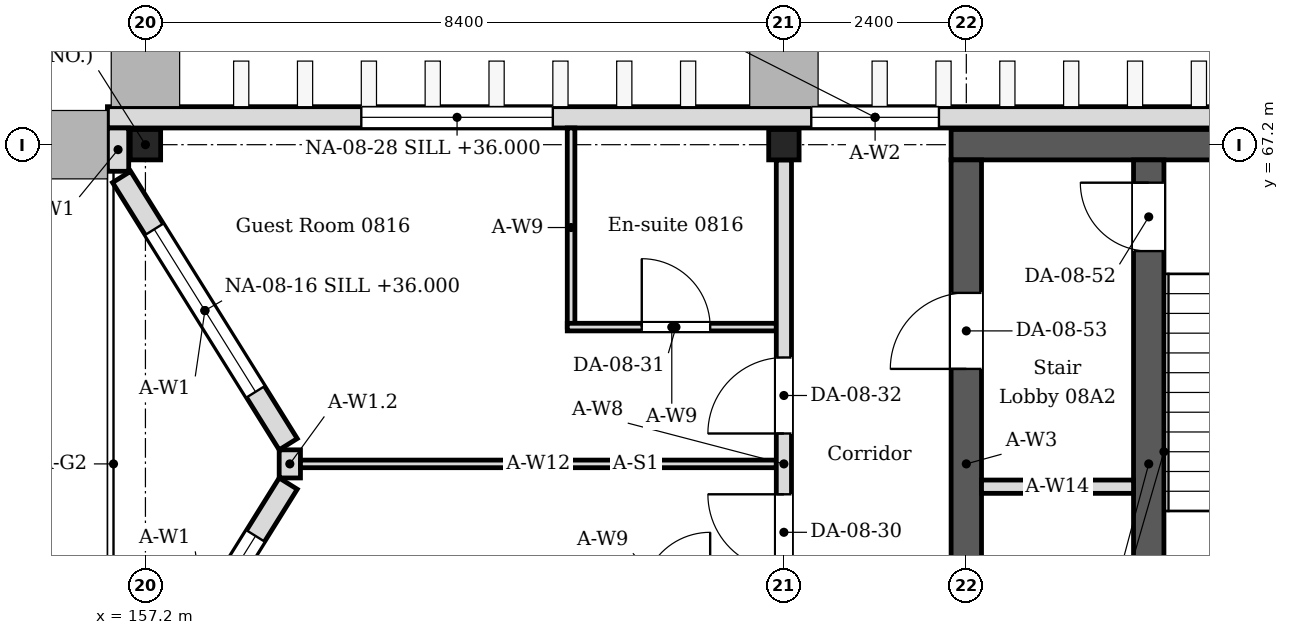
"""IFC4 building model, lengths in metres.
Left out: names, types, materials, properties, quantities, classifications, styles, units other than length and angle.
Written with IfcOpenShell. Run it as: python <this file> out.ifc"""

import sys

from ifc_helpers import new_model, si_unit, direction, frame, frame_2d, origin, origin_2d, place, context, subcontext, project, spatial, rectangle, i_section, extrude, element, fill, save


model = new_model("IFC4")
c1 = context("Model", 3, precision=1e-05, world=origin(), true_north=direction((0.0, 1.0)))
c2 = subcontext(c1, "Body", "Model", "MODEL_VIEW")
j1 = project(units=[si_unit("LENGTHUNIT", "METRE"), si_unit("PLANEANGLEUNIT", "RADIAN")], contexts=[c1])
p1 = place(None, origin())
s1 = spatial("IfcSite", under=j1, at=p1, CompositionType="ELEMENT")
p2 = place(p1, origin())
s2 = spatial("IfcBuilding", under=s1, at=p2, CompositionType="ELEMENT")
p3 = place(p2, frame((0.0, 0.0, 35.4)))
s3 = spatial("IfcBuildingStorey", under=s2, at=p3, CompositionType="ELEMENT", Elevation=35.4)
for number, where, z_axis, x_axis in (
    (1, (157.2, 67.2, 0.0), (0.0, 0.0, 1.0), (1.0, 0.0, 0.0)),
    (2, (165.6, 67.2, 0.0), (0.0, 0.0, 1.0), (1.0, 0.0, 0.0)),
):
    element("IfcColumn", number, at=place(p3, frame(where, z_axis=z_axis, x_axis=x_axis)), inside=s3, PredefinedType="COLUMN", context=c2, shape_type="SweptSolid", body=[
        extrude(i_section(OverallWidth=0.4, OverallDepth=0.4, WebThickness=0.013, FlangeThickness=0.021, FilletRadius=0.022, at=origin_2d()), origin(), (0.0, 0.0, 1.0), 4.2),
    ])
p4 = place(p3, frame((167.8, 67.2, 0.0), z_axis=(0.0, 0.0, 1.0), x_axis=(1.0, 0.0, 0.0)))
e3 = element("IfcWall", 3, at=p4, inside=s3, PredefinedType="SOLIDWALL", context=c2, shape_type="SweptSolid", body=[
    extrude(rectangle(XDim=8.8, YDim=0.4, at=frame_2d((4.4, 0.0))), origin(), (0.0, 0.0, 1.0), 4.05),
])
p5 = place(p3, frame((168.0, 59.0, 0.0), z_axis=(0.0, 0.0, 1.0), x_axis=(0.0, 1.0, 0.0)))
e4 = element("IfcWall", 4, at=p5, inside=s3, PredefinedType="SOLIDWALL", context=c2, shape_type="SweptSolid", body=[
    extrude(rectangle(XDim=8.0, YDim=0.4, at=frame_2d((4.0, 0.0))), origin(), (0.0, 0.0, 1.0), 4.05),
])
p6 = place(p5, frame((5.25, 0.0, 0.0)))
e5 = element("IfcOpeningElement", 5, at=p6, cuts=e4, PredefinedType="OPENING", context=c2, shape_type="SweptSolid", body=[
    extrude(rectangle(XDim=1.0, YDim=2.1, at=frame_2d((0.5, 1.05))), frame((0.0, 0.21, 0.0), z_axis=(0.0, -1.0, 0.0), x_axis=(1.0, 0.0, 0.0)), (0.0, 0.0, 1.0), 0.42),
])
p7 = place(p5, frame((1.275, 0.0, 0.0)))
e6 = element("IfcOpeningElement", 6, at=p7, cuts=e4, PredefinedType="OPENING", context=c2, shape_type="SweptSolid", body=[
    extrude(rectangle(XDim=1.05, YDim=2.1, at=frame_2d((0.525, 1.05))), frame((0.0, 0.21, 0.0), z_axis=(0.0, -1.0, 0.0), x_axis=(1.0, 0.0, 0.0)), (0.0, 0.0, 1.0), 0.42),
])
p8 = place(p3, frame((156.886, 59.224, 0.0), z_axis=(0.0, 0.0, 1.0), x_axis=(0.529018946142, 0.848610013271, 0.0)))
e7 = element("IfcWall", 7, at=p8, inside=s3, PredefinedType="SOLIDWALL", context=c2, shape_type="SweptSolid", body=[
    extrude(rectangle(XDim=4.144, YDim=0.28, at=frame_2d((2.072, 0.0))), origin(), (0.0, 0.0, 1.0), 4.05),
])
p9 = place(p8, frame((0.812, 0.0, 0.6)))
e8 = element("IfcOpeningElement", 8, at=p9, cuts=e7, PredefinedType="OPENING", context=c2, shape_type="SweptSolid", body=[
    extrude(rectangle(XDim=2.52, YDim=2.4, at=frame_2d((1.26, 1.2))), frame((0.0, 0.15, 0.0), z_axis=(0.0, -1.0, 0.0), x_axis=(1.0, 0.0, 0.0)), (0.0, 0.0, 1.0), 0.3),
])
p10 = place(p3, frame((159.079, 63.259, 0.0), z_axis=(0.0, 0.0, 1.0), x_axis=(-0.529018946142, 0.848610013271, 0.0)))
e9 = element("IfcWall", 9, at=p10, inside=s3, PredefinedType="SOLIDWALL", context=c2, shape_type="SweptSolid", body=[
    extrude(rectangle(XDim=4.144, YDim=0.28, at=frame_2d((2.072, 0.0))), origin(), (0.0, 0.0, 1.0), 4.05),
])
p11 = place(p10, frame((0.812, 0.0, 0.6)))
e10 = element("IfcOpeningElement", 10, at=p11, cuts=e9, PredefinedType="OPENING", context=c2, shape_type="SweptSolid", body=[
    extrude(rectangle(XDim=2.52, YDim=2.4, at=frame_2d((1.26, 1.2))), frame((0.0, 0.15, 0.0), z_axis=(0.0, -1.0, 0.0), x_axis=(1.0, 0.0, 0.0)), (0.0, 0.0, 1.0), 0.3),
])
p12 = place(p3, frame((159.1, 62.815, 0.0), z_axis=(0.0, 0.0, 1.0), x_axis=(0.0, 1.0, 0.0)))
e11 = element("IfcWall", 11, at=p12, inside=s3, PredefinedType="SOLIDWALL", context=c2, shape_type="SweptSolid", body=[
    extrude(rectangle(XDim=0.37, YDim=0.28, at=frame_2d((0.185, 0.0))), origin(), (0.0, 0.0, 1.0), 3.604),
])
p13 = place(p3, frame((156.84, 66.85, 0.0), z_axis=(0.0, 0.0, 1.0), x_axis=(0.0, 1.0, 0.0)))
e12 = element("IfcWall", 12, at=p13, inside=s3, PredefinedType="SOLIDWALL", context=c2, shape_type="SweptSolid", body=[
    extrude(rectangle(XDim=0.57, YDim=0.28, at=frame_2d((0.285, 0.0))), origin(), (0.0, 0.0, 1.0), 4.05),
])
p14 = place(p3, frame((156.7, 67.56, 0.0), z_axis=(0.0, 0.0, 1.0), x_axis=(1.0, 0.0, 0.0)))
e13 = element("IfcWall", 13, at=p14, inside=s3, PredefinedType="SOLIDWALL", context=c2, shape_type="SweptSolid", body=[
    extrude(rectangle(XDim=20.2, YDim=0.28, at=frame_2d((10.1, 0.0))), origin(), (0.0, 0.0, 1.0), 4.05),
])
p15 = place(p14, frame((9.26, 0.0, 0.6)))
e14 = element("IfcOpeningElement", 14, at=p15, cuts=e13, PredefinedType="OPENING", context=c2, shape_type="SweptSolid", body=[
    extrude(rectangle(XDim=1.68, YDim=2.4, at=frame_2d((0.84, 1.2))), frame((0.0, 0.15, 0.0), z_axis=(0.0, -1.0, 0.0), x_axis=(1.0, 0.0, 0.0)), (0.0, 0.0, 1.0), 0.3),
])
p16 = place(p14, frame((3.34, 0.0, 0.6)))
e15 = element("IfcOpeningElement", 15, at=p16, cuts=e13, PredefinedType="OPENING", context=c2, shape_type="SweptSolid", body=[
    extrude(rectangle(XDim=2.52, YDim=2.4, at=frame_2d((1.26, 1.2))), frame((0.0, 0.15, 0.0), z_axis=(0.0, -1.0, 0.0), x_axis=(1.0, 0.0, 0.0)), (0.0, 0.0, 1.0), 0.3),
])
p17 = place(p3, frame((162.8, 64.8, 0.0), z_axis=(0.0, 0.0, 1.0), x_axis=(0.0, 1.0, 0.0)))
e16 = element("IfcWall", 16, at=p17, inside=s3, PredefinedType="PARTITIONING", context=c2, shape_type="SweptSolid", body=[
    extrude(rectangle(XDim=2.62, YDim=0.1, at=frame_2d((1.31, 0.0))), origin(), (0.0, 0.0, 1.0), 4.05),
])
p18 = place(p3, frame((162.75, 64.8, 0.0), z_axis=(0.0, 0.0, 1.0), x_axis=(1.0, 0.0, 0.0)))
e17 = element("IfcWall", 17, at=p18, inside=s3, PredefinedType="PARTITIONING", context=c2, shape_type="SweptSolid", body=[
    extrude(rectangle(XDim=2.75, YDim=0.1, at=frame_2d((1.375, 0.0))), origin(), (0.0, 0.0, 1.0), 4.05),
])
p19 = place(p18, frame((0.98, 0.0, 0.0)))
e18 = element("IfcOpeningElement", 18, at=p19, cuts=e17, PredefinedType="OPENING", context=c2, shape_type="SweptSolid", body=[
    extrude(rectangle(XDim=0.9, YDim=2.1, at=frame_2d((0.45, 1.05))), frame((0.0, 0.06, 0.0), z_axis=(0.0, -1.0, 0.0), x_axis=(1.0, 0.0, 0.0)), (0.0, 0.0, 1.0), 0.12),
])
p20 = place(p3, frame((159.24, 63.0, 0.0), z_axis=(0.0, 0.0, 1.0), x_axis=(1.0, 0.0, 0.0)))
e19 = element("IfcWall", 19, at=p20, inside=s3, PredefinedType="PARTITIONING", context=c2, shape_type="SweptSolid", body=[
    extrude(rectangle(XDim=6.26, YDim=0.1, at=frame_2d((3.13, 0.0))), origin(), (0.0, 0.0, 1.0), 3.604),
])
p21 = place(p3, frame((165.6, 59.0, 0.0), z_axis=(0.0, 0.0, 1.0), x_axis=(0.0, 1.0, 0.0)))
e20 = element("IfcWall", 20, at=p21, inside=s3, PredefinedType="PARTITIONING", context=c2, shape_type="SweptSolid", body=[
    extrude(rectangle(XDim=8.0, YDim=0.2, at=frame_2d((4.0, 0.0))), origin(), (0.0, 0.0, 1.0), 3.45),
])
p22 = place(p21, frame((2.6, 0.0, 0.0)))
e21 = element("IfcOpeningElement", 21, at=p22, cuts=e20, PredefinedType="OPENING", context=c2, shape_type="SweptSolid", body=[
    extrude(rectangle(XDim=1.0, YDim=2.4, at=frame_2d((0.5, 1.2))), frame((0.0, 0.11, 0.0), z_axis=(0.0, -1.0, 0.0), x_axis=(1.0, 0.0, 0.0)), (0.0, 0.0, 1.0), 0.22),
])
p23 = place(p21, frame((4.4, 0.0, 0.0)))
e22 = element("IfcOpeningElement", 22, at=p23, cuts=e20, PredefinedType="OPENING", context=c2, shape_type="SweptSolid", body=[
    extrude(rectangle(XDim=1.0, YDim=2.4, at=frame_2d((0.5, 1.2))), frame((0.0, 0.11, 0.0), z_axis=(0.0, -1.0, 0.0), x_axis=(1.0, 0.0, 0.0)), (0.0, 0.0, 1.0), 0.22),
])
p24 = place(p3, frame((170.4, 59.0, 0.0), z_axis=(0.0, 0.0, 1.0), x_axis=(0.0, 1.0, 0.0)))
e23 = element("IfcWall", 23, at=p24, inside=s3, PredefinedType="SOLIDWALL", context=c2, shape_type="SweptSolid", body=[
    extrude(rectangle(XDim=8.0, YDim=0.4, at=frame_2d((4.0, 0.0))), origin(), (0.0, 0.0, 1.0), 4.05),
])
p25 = place(p24, frame((6.8, 0.0, 0.0)))
e24 = element("IfcOpeningElement", 24, at=p25, cuts=e23, PredefinedType="OPENING", context=c2, shape_type="SweptSolid", body=[
    extrude(rectangle(XDim=0.9, YDim=2.1, at=frame_2d((0.45, 1.05))), frame((0.0, 0.21, 0.0), z_axis=(0.0, -1.0, 0.0), x_axis=(1.0, 0.0, 0.0)), (0.0, 0.0, 1.0), 0.42),
])
p26 = place(p3, frame((168.2, 62.7, 0.0), z_axis=(0.0, 0.0, 1.0), x_axis=(1.0, 0.0, 0.0)))
e25 = element("IfcWall", 25, at=p26, inside=s3, PredefinedType="PARTITIONING", context=c2, shape_type="SweptSolid", body=[
    extrude(rectangle(XDim=2.0, YDim=0.175, at=frame_2d((1.0, 0.0))), origin(), (0.0, 0.0, 1.0), 4.05),
])
p27 = place(p9, origin())
e26 = element("IfcWindow", 26, at=p27, inside=s3, PartitioningType="SINGLE_PANEL", PredefinedType="WINDOW", context=c2, shape_type="SweptSolid", body=[
    extrude(rectangle(XDim=2.52, YDim=2.4, at=frame_2d((1.26, 1.2))), frame((0.0, 0.03, 0.0), z_axis=(0.0, -1.0, 0.0), x_axis=(1.0, 0.0, 0.0)), (0.0, 0.0, 1.0), 0.06),
])
fill(e8, e26)
p28 = place(p11, origin())
e27 = element("IfcWindow", 27, at=p28, inside=s3, PartitioningType="SINGLE_PANEL", PredefinedType="WINDOW", context=c2, shape_type="SweptSolid", body=[
    extrude(rectangle(XDim=2.52, YDim=2.4, at=frame_2d((1.26, 1.2))), frame((0.0, 0.03, 0.0), z_axis=(0.0, -1.0, 0.0), x_axis=(1.0, 0.0, 0.0)), (0.0, 0.0, 1.0), 0.06),
])
fill(e10, e27)
p29 = place(p15, origin())
e28 = element("IfcWindow", 28, at=p29, inside=s3, PartitioningType="SINGLE_PANEL", PredefinedType="WINDOW", context=c2, shape_type="SweptSolid", body=[
    extrude(rectangle(XDim=1.68, YDim=2.4, at=frame_2d((0.84, 1.2))), frame((0.0, 0.03, 0.0), z_axis=(0.0, -1.0, 0.0), x_axis=(1.0, 0.0, 0.0)), (0.0, 0.0, 1.0), 0.06),
])
fill(e14, e28)
p30 = place(p16, origin())
e29 = element("IfcWindow", 29, at=p30, inside=s3, PartitioningType="SINGLE_PANEL", PredefinedType="WINDOW", context=c2, shape_type="SweptSolid", body=[
    extrude(rectangle(XDim=2.52, YDim=2.4, at=frame_2d((1.26, 1.2))), frame((0.0, 0.03, 0.0), z_axis=(0.0, -1.0, 0.0), x_axis=(1.0, 0.0, 0.0)), (0.0, 0.0, 1.0), 0.06),
])
fill(e15, e29)
p31 = place(p22, origin())
e30 = element("IfcDoor", 30, at=p31, inside=s3, OperationType="SINGLE_SWING_RIGHT", PredefinedType="DOOR", context=c2, shape_type="SweptSolid", body=[
    extrude(rectangle(XDim=1.0, YDim=2.4, at=frame_2d((0.5, 1.2))), frame((0.0, 0.025, 0.0), z_axis=(0.0, -1.0, 0.0), x_axis=(1.0, 0.0, 0.0)), (0.0, 0.0, 1.0), 0.05),
])
fill(e21, e30)
p32 = place(p19, origin())
e31 = element("IfcDoor", 31, at=p32, inside=s3, OperationType="SINGLE_SWING_LEFT", PredefinedType="DOOR", context=c2, shape_type="SweptSolid", body=[
    extrude(rectangle(XDim=0.9, YDim=2.1, at=frame_2d((0.45, 1.05))), frame((0.0, 0.025, 0.0), z_axis=(0.0, -1.0, 0.0), x_axis=(1.0, 0.0, 0.0)), (0.0, 0.0, 1.0), 0.05),
])
fill(e18, e31)
p33 = place(p23, origin())
e32 = element("IfcDoor", 32, at=p33, inside=s3, OperationType="SINGLE_SWING_LEFT", PredefinedType="DOOR", context=c2, shape_type="SweptSolid", body=[
    extrude(rectangle(XDim=1.0, YDim=2.4, at=frame_2d((0.5, 1.2))), frame((0.0, 0.025, 0.0), z_axis=(0.0, -1.0, 0.0), x_axis=(1.0, 0.0, 0.0)), (0.0, 0.0, 1.0), 0.05),
])
fill(e22, e32)
p34 = place(p25, origin())
e33 = element("IfcDoor", 33, at=p34, inside=s3, OperationType="SINGLE_SWING_RIGHT", PredefinedType="DOOR", context=c2, shape_type="SweptSolid", body=[
    extrude(rectangle(XDim=0.9, YDim=2.1, at=frame_2d((0.45, 1.05))), frame((0.0, 0.025, 0.0), z_axis=(0.0, -1.0, 0.0), x_axis=(1.0, 0.0, 0.0)), (0.0, 0.0, 1.0), 0.05),
])
fill(e24, e33)
p35 = place(p6, origin())
e34 = element("IfcDoor", 34, at=p35, inside=s3, OperationType="SINGLE_SWING_LEFT", PredefinedType="DOOR", context=c2, shape_type="SweptSolid", body=[
    extrude(rectangle(XDim=1.0, YDim=2.1, at=frame_2d((0.5, 1.05))), frame((0.0, 0.025, 0.0), z_axis=(0.0, -1.0, 0.0), x_axis=(1.0, 0.0, 0.0)), (0.0, 0.0, 1.0), 0.05),
])
fill(e5, e34)
save(model, sys.argv[1])
